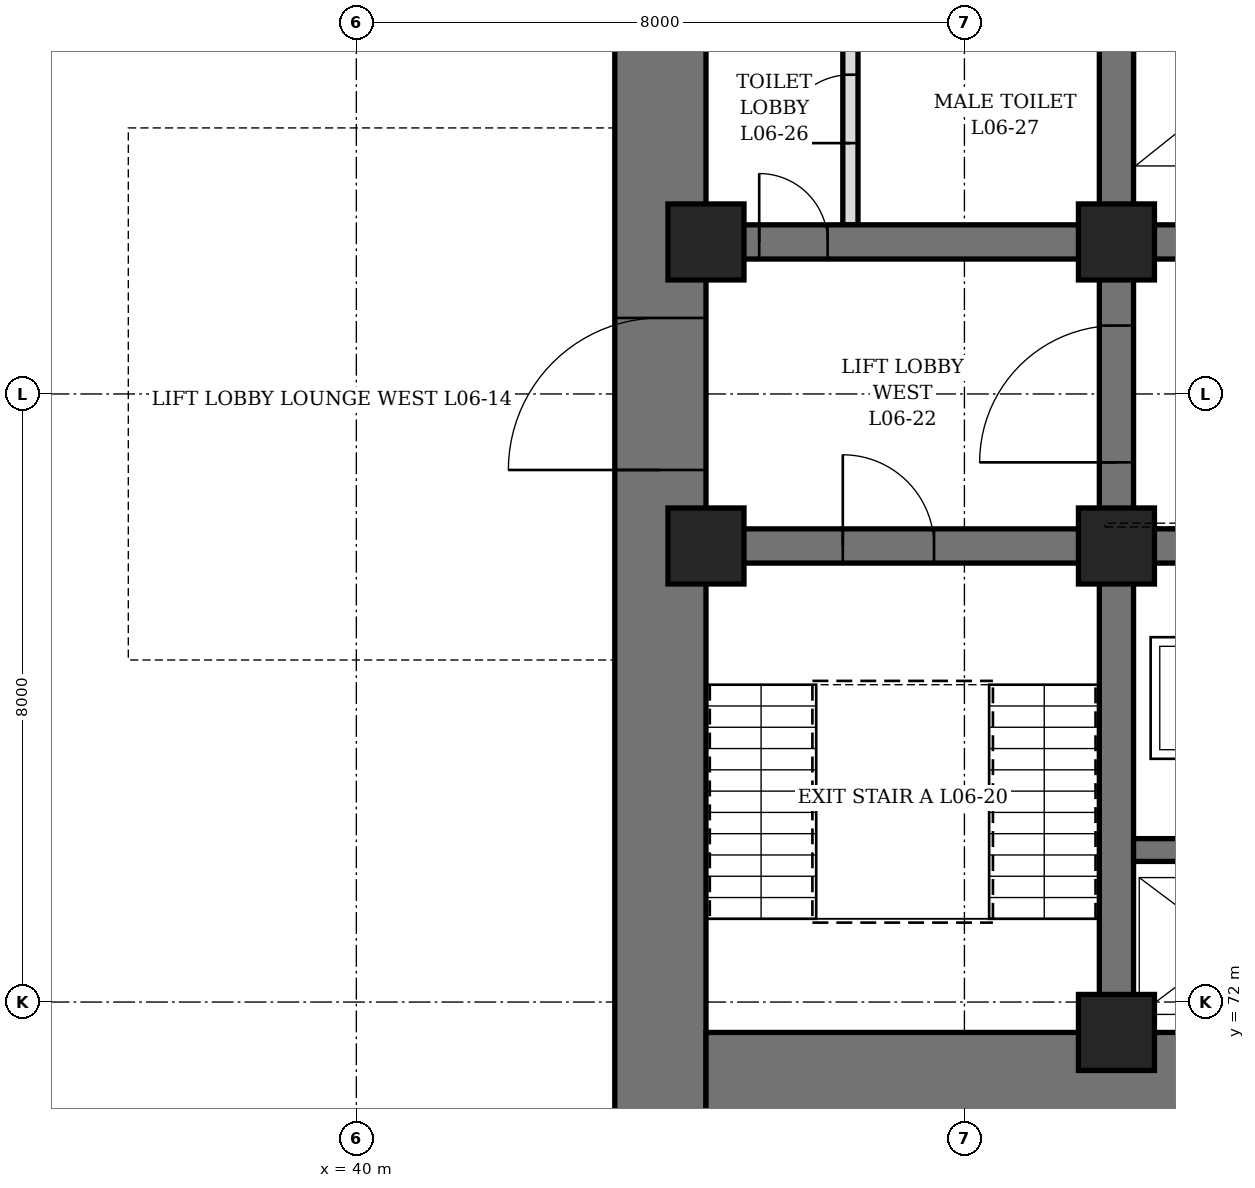
"""IFC4 building model, lengths in metres.
Left out: names, types, materials, properties, quantities, classifications, styles, units other than length and angle.
Written with IfcOpenShell. Run it as: python <this file> out.ifc"""

import sys

from ifc_helpers import new_model, si_unit, direction, frame, frame_2d, origin, origin_2d, place, context, subcontext, project, spatial, rectangle, hollow_rectangle, extrude, element, fill, save


model = new_model("IFC4")
c1 = context("Model", 3, precision=1e-05, world=origin(), true_north=direction((0.0, 1.0)))
c2 = subcontext(c1, "Body", "Model", "MODEL_VIEW")
j1 = project(units=[si_unit("LENGTHUNIT", "METRE"), si_unit("PLANEANGLEUNIT", "RADIAN")], contexts=[c1])
p1 = place(None, origin())
s1 = spatial("IfcSite", under=j1, at=p1, CompositionType="ELEMENT")
p2 = place(p1, origin())
s2 = spatial("IfcBuilding", under=s1, at=p2, CompositionType="ELEMENT")
p3 = place(p2, frame((0.0, 0.0, 34.9)))
s3 = spatial("IfcBuildingStorey", under=s2, at=p3, CompositionType="ELEMENT", Elevation=34.9)
p4 = place(p3, frame((44.0, 70.4, 0.0), z_axis=(0.0, 0.0, 1.0), x_axis=(0.0, 1.0, 0.0)))
e1 = element("IfcWall", 1, at=p4, inside=s3, PredefinedType="SHEAR", context=c2, shape_type="SweptSolid", body=[
    extrude(rectangle(XDim=19.2, YDim=1.2, at=frame_2d((9.6, 0.0))), origin(), (0.0, 0.0, 1.0), 4.2),
])
p5 = place(p4, frame((8.6, 0.0, 0.0)))
e2 = element("IfcOpeningElement", 2, at=p5, cuts=e1, PredefinedType="OPENING", context=c2, shape_type="SweptSolid", body=[
    extrude(rectangle(XDim=2.0, YDim=2.4, at=frame_2d((1.0, 1.2))), frame((0.0, 0.61, 0.0), z_axis=(0.0, -1.0, 0.0), x_axis=(1.0, 0.0, 0.0)), (0.0, 0.0, 1.0), 1.22),
])
p6 = place(p3, frame((44.6, 71.0, 0.0), z_axis=(0.0, 0.0, 1.0), x_axis=(1.0, 0.0, 0.0)))
e3 = element("IfcWall", 3, at=p6, inside=s3, PredefinedType="SHEAR", context=c2, shape_type="SweptSolid", body=[
    extrude(rectangle(XDim=22.8, YDim=1.2, at=frame_2d((11.4, 0.0))), origin(), (0.0, 0.0, 1.0), 4.2),
])
p7 = place(p3, frame((50.0, 71.6, 0.0), z_axis=(0.0, 0.0, 1.0), x_axis=(0.0, 1.0, 0.0)))
e4 = element("IfcWall", 4, at=p7, inside=s3, PredefinedType="SHEAR", context=c2, shape_type="SweptSolid", body=[
    extrude(rectangle(XDim=16.8, YDim=0.45, at=frame_2d((8.4, 0.0))), origin(), (0.0, 0.0, 1.0), 4.2),
])
p8 = place(p7, frame((7.5, 0.0, 0.0)))
e5 = element("IfcOpeningElement", 5, at=p8, cuts=e4, PredefinedType="OPENING", context=c2, shape_type="SweptSolid", body=[
    extrude(rectangle(XDim=1.8, YDim=2.4, at=frame_2d((0.9, 1.2))), frame((0.0, 0.235, 0.0), z_axis=(0.0, -1.0, 0.0), x_axis=(1.0, 0.0, 0.0)), (0.0, 0.0, 1.0), 0.47),
])
p9 = place(p3, frame((44.6, 78.0, 0.0), z_axis=(0.0, 0.0, 1.0), x_axis=(1.0, 0.0, 0.0)))
e6 = element("IfcWall", 6, at=p9, inside=s3, PredefinedType="SHEAR", context=c2, shape_type="SweptSolid", body=[
    extrude(rectangle(XDim=5.175, YDim=0.45, at=frame_2d((2.587, 0.0))), origin(), (0.0, 0.0, 1.0), 4.2),
])
p10 = place(p9, frame((1.8, 0.0, 0.0)))
e7 = element("IfcOpeningElement", 7, at=p10, cuts=e6, PredefinedType="OPENING", context=c2, shape_type="SweptSolid", body=[
    extrude(rectangle(XDim=1.2, YDim=2.1, at=frame_2d((0.6, 1.05))), frame((0.0, 0.235, 0.0), z_axis=(0.0, -1.0, 0.0), x_axis=(1.0, 0.0, 0.0)), (0.0, 0.0, 1.0), 0.47),
])
p11 = place(p3, frame((44.6, 82.0, 0.0), z_axis=(0.0, 0.0, 1.0), x_axis=(1.0, 0.0, 0.0)))
e8 = element("IfcWall", 8, at=p11, inside=s3, PredefinedType="SHEAR", context=c2, shape_type="SweptSolid", body=[
    extrude(rectangle(XDim=5.175, YDim=0.45, at=frame_2d((2.587, 0.0))), origin(), (0.0, 0.0, 1.0), 4.2),
])
p12 = place(p11, frame((0.7, 0.0, 0.0)))
e9 = element("IfcOpeningElement", 9, at=p12, cuts=e8, PredefinedType="OPENING", context=c2, shape_type="SweptSolid", body=[
    extrude(rectangle(XDim=0.9, YDim=2.1, at=frame_2d((0.45, 1.05))), frame((0.0, 0.235, 0.0), z_axis=(0.0, -1.0, 0.0), x_axis=(1.0, 0.0, 0.0)), (0.0, 0.0, 1.0), 0.47),
])
p13 = place(p3, frame((50.225, 78.0, 0.0), z_axis=(0.0, 0.0, 1.0), x_axis=(1.0, 0.0, 0.0)))
e10 = element("IfcWall", 10, at=p13, inside=s3, PredefinedType="SHEAR", context=c2, shape_type="SweptSolid", body=[
    extrude(rectangle(XDim=11.55, YDim=0.45, at=frame_2d((5.775, 0.0))), origin(), (0.0, 0.0, 1.0), 4.2),
])
p14 = place(p13, frame((0.725, 0.0, 0.0)))
e11 = element("IfcOpeningElement", 11, at=p14, cuts=e10, PredefinedType="OPENING", context=c2, shape_type="SweptSolid", body=[
    extrude(rectangle(XDim=1.1, YDim=2.2, at=frame_2d((0.55, 1.1))), frame((0.0, 0.235, 0.0), z_axis=(0.0, -1.0, 0.0), x_axis=(1.0, 0.0, 0.0)), (0.0, 0.0, 1.0), 0.47),
])
p15 = place(p13, frame((3.725, 0.0, 0.0)))
e12 = element("IfcOpeningElement", 12, at=p15, cuts=e10, PredefinedType="OPENING", context=c2, shape_type="SweptSolid", body=[
    extrude(rectangle(XDim=1.1, YDim=2.2, at=frame_2d((0.55, 1.1))), frame((0.0, 0.235, 0.0), z_axis=(0.0, -1.0, 0.0), x_axis=(1.0, 0.0, 0.0)), (0.0, 0.0, 1.0), 0.47),
])
p16 = place(p13, frame((6.725, 0.0, 0.0)))
e13 = element("IfcOpeningElement", 13, at=p16, cuts=e10, PredefinedType="OPENING", context=c2, shape_type="SweptSolid", body=[
    extrude(rectangle(XDim=1.1, YDim=2.2, at=frame_2d((0.55, 1.1))), frame((0.0, 0.235, 0.0), z_axis=(0.0, -1.0, 0.0), x_axis=(1.0, 0.0, 0.0)), (0.0, 0.0, 1.0), 0.47),
])
p17 = place(p13, frame((9.725, 0.0, 0.0)))
e14 = element("IfcOpeningElement", 14, at=p17, cuts=e10, PredefinedType="OPENING", context=c2, shape_type="SweptSolid", body=[
    extrude(rectangle(XDim=1.1, YDim=2.2, at=frame_2d((0.55, 1.1))), frame((0.0, 0.235, 0.0), z_axis=(0.0, -1.0, 0.0), x_axis=(1.0, 0.0, 0.0)), (0.0, 0.0, 1.0), 0.47),
])
p18 = place(p3, frame((50.225, 82.0, 0.0), z_axis=(0.0, 0.0, 1.0), x_axis=(1.0, 0.0, 0.0)))
e15 = element("IfcWall", 15, at=p18, inside=s3, PredefinedType="SHEAR", context=c2, shape_type="SweptSolid", body=[
    extrude(rectangle(XDim=11.55, YDim=0.45, at=frame_2d((5.775, 0.0))), origin(), (0.0, 0.0, 1.0), 4.2),
])
p19 = place(p3, frame((50.225, 74.0, 0.0), z_axis=(0.0, 0.0, 1.0), x_axis=(1.0, 0.0, 0.0)))
e16 = element("IfcWall", 16, at=p19, inside=s3, PredefinedType="SHEAR", context=c2, shape_type="SweptSolid", body=[
    extrude(rectangle(XDim=11.55, YDim=0.3, at=frame_2d((5.775, 0.0))), origin(), (0.0, 0.0, 1.0), 4.2),
])
for number, where, z_axis, x_axis in (
    (17, (44.6, 78.0, 0.0), (0.0, 0.0, 1.0), (1.0, 0.0, 0.0)),
    (18, (44.6, 82.0, 0.0), (0.0, 0.0, 1.0), (1.0, 0.0, 0.0)),
    (19, (50.0, 71.6, 0.0), (0.0, 0.0, 1.0), (1.0, 0.0, 0.0)),
    (20, (50.0, 78.0, 0.0), (0.0, 0.0, 1.0), (1.0, 0.0, 0.0)),
    (21, (50.0, 82.0, 0.0), (0.0, 0.0, 1.0), (1.0, 0.0, 0.0)),
):
    element("IfcColumn", number, at=place(p3, frame(where, z_axis=z_axis, x_axis=x_axis)), inside=s3, PredefinedType="COLUMN", context=c2, shape_type="SweptSolid", body=[
        extrude(hollow_rectangle(XDim=1.0, YDim=1.0, WallThickness=0.15, at=origin_2d()), origin(), (0.0, 0.0, 1.0), 4.2),
    ])
p20 = place(p3, frame((46.5, 82.225, 0.0), z_axis=(0.0, 0.0, 1.0), x_axis=(0.0, 1.0, 0.0)))
e22 = element("IfcWall", 22, at=p20, inside=s3, PredefinedType="PARTITIONING", context=c2, shape_type="SweptSolid", body=[
    extrude(rectangle(XDim=3.05, YDim=0.2, at=frame_2d((1.525, 0.0))), origin(), (0.0, 0.0, 1.0), 4.04),
])
p21 = place(p20, frame((1.075, 0.0, 0.0)))
e23 = element("IfcOpeningElement", 23, at=p21, cuts=e22, PredefinedType="OPENING", context=c2, shape_type="SweptSolid", body=[
    extrude(rectangle(XDim=0.9, YDim=2.1, at=frame_2d((0.45, 1.05))), frame((0.0, 0.11, 0.0), z_axis=(0.0, -1.0, 0.0), x_axis=(1.0, 0.0, 0.0)), (0.0, 0.0, 1.0), 0.22),
])
p22 = place(p12, origin())
e24 = element("IfcDoor", 24, at=p22, inside=s3, OperationType="SINGLE_SWING_LEFT", PredefinedType="DOOR", context=c2, shape_type="SweptSolid", body=[
    extrude(rectangle(XDim=0.9, YDim=2.1, at=frame_2d((0.45, 1.05))), frame((0.0, 0.225, 0.0), z_axis=(0.0, -1.0, 0.0), x_axis=(1.0, 0.0, 0.0)), (0.0, 0.0, 1.0), 0.449),
])
fill(e9, e24)
p23 = place(p21, origin())
e25 = element("IfcDoor", 25, at=p23, inside=s3, OperationType="SINGLE_SWING_RIGHT", PredefinedType="DOOR", context=c2, shape_type="SweptSolid", body=[
    extrude(rectangle(XDim=0.9, YDim=2.1, at=frame_2d((0.45, 1.05))), frame((0.0, 0.1, 0.0), z_axis=(0.0, -1.0, 0.0), x_axis=(1.0, 0.0, 0.0)), (0.0, 0.0, 1.0), 0.199),
])
fill(e23, e25)
p24 = place(p10, origin())
e26 = element("IfcDoor", 26, at=p24, inside=s3, OperationType="SINGLE_SWING_LEFT", PredefinedType="DOOR", context=c2, shape_type="SweptSolid", body=[
    extrude(rectangle(XDim=1.2, YDim=2.1, at=frame_2d((0.6, 1.05))), frame((0.0, 0.225, 0.0), z_axis=(0.0, -1.0, 0.0), x_axis=(1.0, 0.0, 0.0)), (0.0, 0.0, 1.0), 0.449),
])
fill(e7, e26)
p25 = place(p5, origin())
e27 = element("IfcDoor", 27, at=p25, inside=s3, OperationType="DOUBLE_DOOR_SINGLE_SWING", PredefinedType="DOOR", context=c2, shape_type="SweptSolid", body=[
    extrude(rectangle(XDim=2.0, YDim=2.4, at=frame_2d((1.0, 1.2))), frame((0.0, 0.35, 0.0), z_axis=(0.0, -1.0, 0.0), x_axis=(1.0, 0.0, 0.0)), (0.0, 0.0, 1.0), 0.7),
])
fill(e2, e27)
p26 = place(p8, origin())
e28 = element("IfcDoor", 28, at=p26, inside=s3, OperationType="DOUBLE_DOOR_SINGLE_SWING", PredefinedType="DOOR", context=c2, shape_type="SweptSolid", body=[
    extrude(rectangle(XDim=1.8, YDim=2.4, at=frame_2d((0.9, 1.2))), frame((0.0, 0.225, 0.0), z_axis=(0.0, -1.0, 0.0), x_axis=(1.0, 0.0, 0.0)), (0.0, 0.0, 1.0), 0.449),
])
fill(e5, e28)
save(model, sys.argv[1])
